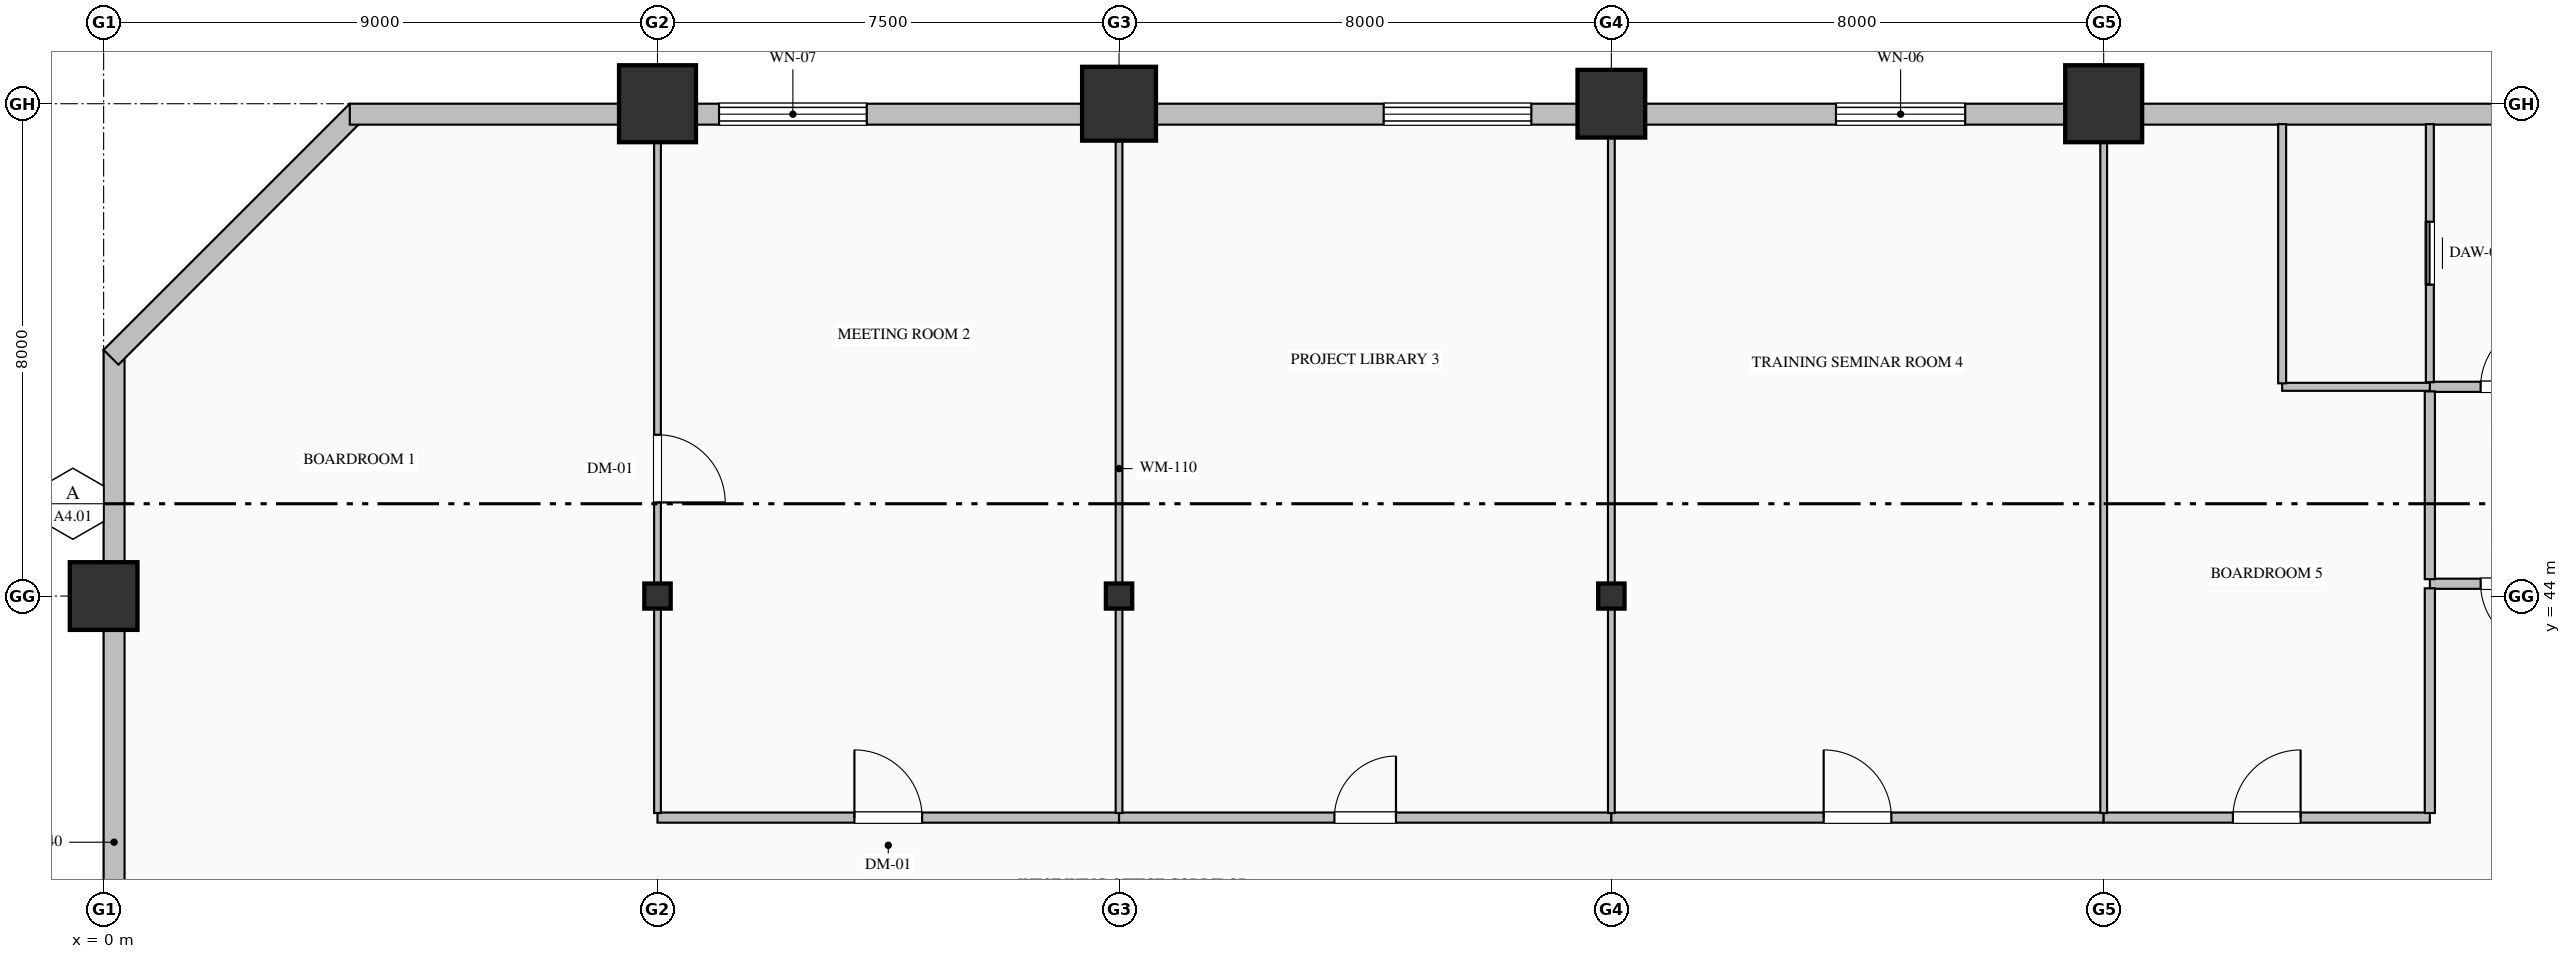
"""IFC4 building model, lengths in metres.
Left out: names, types, materials, properties, quantities, classifications, styles, units other than length and angle.
Written with IfcOpenShell. Run it as: python <this file> out.ifc"""

import sys

from ifc_helpers import new_model, si_unit, direction, frame, frame_2d, origin, origin_2d, place, context, subcontext, project, spatial, rectangle, hollow_rectangle, hollow_circle, i_section, extrude, element, fill, save


model = new_model("IFC4")
c1 = context("Model", 3, precision=1e-05, world=origin(), true_north=direction((0.0, 1.0)))
c2 = subcontext(c1, "Body", "Model", "MODEL_VIEW")
j1 = project(units=[si_unit("LENGTHUNIT", "METRE"), si_unit("PLANEANGLEUNIT", "RADIAN")], contexts=[c1])
p1 = place(None, origin())
s1 = spatial("IfcSite", under=j1, at=p1, CompositionType="ELEMENT")
p2 = place(p1, origin())
s2 = spatial("IfcBuilding", under=s1, at=p2, CompositionType="ELEMENT")
p3 = place(p2, frame((0.0, 0.0, 48.2)))
s3 = spatial("IfcBuildingStorey", under=s2, at=p3, CompositionType="ELEMENT", Elevation=48.2)
p4 = place(p3, frame((0.0, 44.0, 0.0), z_axis=(0.0, 0.0, 1.0), x_axis=(1.0, 0.0, 0.0)))
e1 = element("IfcColumn", 1, at=p4, inside=s3, PredefinedType="COLUMN", context=c2, shape_type="SweptSolid", body=[
    extrude(hollow_rectangle(XDim=1.1, YDim=1.1, WallThickness=0.04, at=origin_2d()), origin(), (0.0, 0.0, 1.0), 4.0),
])
p5 = place(p3, frame((9.0, 44.0, 0.0), z_axis=(0.0, 0.0, 1.0), x_axis=(1.0, 0.0, 0.0)))
e2 = element("IfcColumn", 2, at=p5, inside=s3, PredefinedType="COLUMN", context=c2, shape_type="SweptSolid", body=[
    extrude(i_section(OverallWidth=0.407, OverallDepth=0.428, WebThickness=0.02, FlangeThickness=0.035, FilletRadius=0.022, at=origin_2d()), origin(), (0.0, 0.0, 1.0), 4.0),
])
p6 = place(p3, frame((9.0, 52.0, 0.0), z_axis=(0.0, 0.0, 1.0), x_axis=(1.0, 0.0, 0.0)))
e3 = element("IfcColumn", 3, at=p6, inside=s3, PredefinedType="COLUMN", context=c2, shape_type="SweptSolid", body=[
    extrude(hollow_rectangle(XDim=1.25, YDim=1.25, WallThickness=0.045, at=origin_2d()), origin(), (0.0, 0.0, 1.0), 4.0),
])
p7 = place(p3, frame((16.5, 44.0, 0.0), z_axis=(0.0, 0.0, 1.0), x_axis=(1.0, 0.0, 0.0)))
e4 = element("IfcColumn", 4, at=p7, inside=s3, PredefinedType="COLUMN", context=c2, shape_type="SweptSolid", body=[
    extrude(i_section(OverallWidth=0.407, OverallDepth=0.428, WebThickness=0.02, FlangeThickness=0.035, FilletRadius=0.022, at=origin_2d()), origin(), (0.0, 0.0, 1.0), 4.0),
])
p8 = place(p3, frame((16.5, 52.0, 0.0), z_axis=(0.0, 0.0, 1.0), x_axis=(1.0, 0.0, 0.0)))
e5 = element("IfcColumn", 5, at=p8, inside=s3, PredefinedType="COLUMN", context=c2, shape_type="SweptSolid", body=[
    extrude(hollow_circle(Radius=0.6, WallThickness=0.04, at=origin_2d()), origin(), (0.0, 0.0, 1.0), 4.0),
])
p9 = place(p3, frame((24.5, 44.0, 0.0), z_axis=(0.0, 0.0, 1.0), x_axis=(1.0, 0.0, 0.0)))
e6 = element("IfcColumn", 6, at=p9, inside=s3, PredefinedType="COLUMN", context=c2, shape_type="SweptSolid", body=[
    extrude(i_section(OverallWidth=0.407, OverallDepth=0.428, WebThickness=0.02, FlangeThickness=0.035, FilletRadius=0.022, at=origin_2d()), origin(), (0.0, 0.0, 1.0), 4.0),
])
p10 = place(p3, frame((24.5, 52.0, 0.0), z_axis=(0.0, 0.0, 1.0), x_axis=(1.0, 0.0, 0.0)))
e7 = element("IfcColumn", 7, at=p10, inside=s3, PredefinedType="COLUMN", context=c2, shape_type="SweptSolid", body=[
    extrude(hollow_rectangle(XDim=1.1, YDim=1.1, WallThickness=0.04, at=origin_2d()), origin(), (0.0, 0.0, 1.0), 4.0),
])
p11 = place(p3, frame((32.5, 52.0, 0.0), z_axis=(0.0, 0.0, 1.0), x_axis=(1.0, 0.0, 0.0)))
e8 = element("IfcColumn", 8, at=p11, inside=s3, PredefinedType="COLUMN", context=c2, shape_type="SweptSolid", body=[
    extrude(hollow_rectangle(XDim=1.25, YDim=1.25, WallThickness=0.045, at=origin_2d()), origin(), (0.0, 0.0, 1.0), 4.0),
])
p12 = place(p3, frame((0.17, 32.0, 0.0), z_axis=(0.0, 0.0, 1.0), x_axis=(0.0, 1.0, 0.0)))
e9 = element("IfcWall", 9, at=p12, inside=s3, PredefinedType="SOLIDWALL", context=c2, shape_type="SweptSolid", body=[
    extrude(rectangle(XDim=16.0, YDim=0.34, at=frame_2d((8.0, 0.0))), origin(), (0.0, 0.0, 1.0), 3.25),
])
p13 = place(p3, frame((0.12, 47.88, 0.0), z_axis=(0.0, 0.0, 1.0), x_axis=(0.707106781187, 0.707106781187, 0.0)))
e10 = element("IfcWall", 10, at=p13, inside=s3, PredefinedType="SOLIDWALL", context=c2, shape_type="SweptSolid", body=[
    extrude(rectangle(XDim=5.657, YDim=0.34, at=frame_2d((2.828, 0.0))), origin(), (0.0, 0.0, 1.0), 3.75),
])
p14 = place(p3, frame((4.0, 51.83, 0.0), z_axis=(0.0, 0.0, 1.0), x_axis=(1.0, 0.0, 0.0)))
e11 = element("IfcWall", 11, at=p14, inside=s3, PredefinedType="SOLIDWALL", context=c2, shape_type="SweptSolid", body=[
    extrude(rectangle(XDim=36.52, YDim=0.34, at=frame_2d((18.26, 0.0))), origin(), (0.0, 0.0, 1.0), 3.25),
])
p15 = place(p14, frame((6.0, 0.0, 0.8)))
e12 = element("IfcOpeningElement", 12, at=p15, cuts=e11, PredefinedType="OPENING", context=c2, shape_type="SweptSolid", body=[
    extrude(rectangle(XDim=2.4, YDim=2.15, at=frame_2d((1.2, 1.075))), frame((0.0, 0.18, 0.0), z_axis=(0.0, -1.0, 0.0), x_axis=(1.0, 0.0, 0.0)), (0.0, 0.0, 1.0), 0.36),
])
p16 = place(p14, frame((16.8, 0.0, 0.8)))
e13 = element("IfcOpeningElement", 13, at=p16, cuts=e11, PredefinedType="OPENING", context=c2, shape_type="SweptSolid", body=[
    extrude(rectangle(XDim=2.4, YDim=2.15, at=frame_2d((1.2, 1.075))), frame((0.0, 0.18, 0.0), z_axis=(0.0, -1.0, 0.0), x_axis=(1.0, 0.0, 0.0)), (0.0, 0.0, 1.0), 0.36),
])
p17 = place(p14, frame((24.15, 0.0, 0.85)))
e14 = element("IfcOpeningElement", 14, at=p17, cuts=e11, PredefinedType="OPENING", context=c2, shape_type="SweptSolid", body=[
    extrude(rectangle(XDim=2.1, YDim=2.05, at=frame_2d((1.05, 1.025))), frame((0.0, 0.18, 0.0), z_axis=(0.0, -1.0, 0.0), x_axis=(1.0, 0.0, 0.0)), (0.0, 0.0, 1.0), 0.36),
])
p18 = place(p3, frame((37.8, 47.4, 0.0), z_axis=(0.0, 0.0, 1.0), x_axis=(1.0, 0.0, 0.0)))
e15 = element("IfcWall", 15, at=p18, inside=s3, PredefinedType="PARTITIONING", context=c2, shape_type="SweptSolid", body=[
    extrude(rectangle(XDim=2.7, YDim=0.165, at=frame_2d((1.35, 0.0))), origin(), (0.0, 0.0, 1.0), 3.75),
])
p19 = place(p18, frame((0.825, 0.0, 0.0)))
e16 = element("IfcOpeningElement", 16, at=p19, cuts=e15, PredefinedType="OPENING", context=c2, shape_type="SweptSolid", body=[
    extrude(rectangle(XDim=1.05, YDim=2.15, at=frame_2d((0.525, 1.075))), frame((0.0, 0.093, 0.0), z_axis=(0.0, -1.0, 0.0), x_axis=(1.0, 0.0, 0.0)), (0.0, 0.0, 1.0), 0.185),
])
p20 = place(p3, frame((40.5, 44.2, 0.0), z_axis=(0.0, 0.0, 1.0), x_axis=(-1.0, 0.0, 0.0)))
e17 = element("IfcWall", 17, at=p20, inside=s3, PredefinedType="PARTITIONING", context=c2, shape_type="SweptSolid", body=[
    extrude(rectangle(XDim=2.7, YDim=0.165, at=frame_2d((1.35, 0.0))), origin(), (0.0, 0.0, 1.0), 3.75),
])
p21 = place(p20, frame((0.825, 0.0, 0.0)))
e18 = element("IfcOpeningElement", 18, at=p21, cuts=e17, PredefinedType="OPENING", context=c2, shape_type="SweptSolid", body=[
    extrude(rectangle(XDim=1.05, YDim=2.15, at=frame_2d((0.525, 1.075))), frame((0.0, 0.093, 0.0), z_axis=(0.0, -1.0, 0.0), x_axis=(1.0, 0.0, 0.0)), (0.0, 0.0, 1.0), 0.185),
])
p22 = place(p3, frame((37.8, 44.274, 0.0), z_axis=(0.0, 0.0, 1.0), x_axis=(0.0, 1.0, 0.0)))
e19 = element("IfcWall", 19, at=p22, inside=s3, PredefinedType="PARTITIONING", context=c2, shape_type="SweptSolid", body=[
    extrude(rectangle(XDim=3.051, YDim=0.165, at=frame_2d((1.525, 0.0))), origin(), (0.0, 0.0, 1.0), 3.75),
])
p23 = place(p3, frame((37.8, 47.475, 0.0), z_axis=(0.0, 0.0, 1.0), x_axis=(0.0, 1.0, 0.0)))
e20 = element("IfcWall", 20, at=p23, inside=s3, PredefinedType="PARTITIONING", context=c2, shape_type="SweptSolid", body=[
    extrude(rectangle(XDim=4.193, YDim=0.13, at=frame_2d((2.097, 0.0))), origin(), (0.0, 0.0, 1.0), 3.75),
])
p24 = place(p23, frame((1.587, 0.0, 0.0)))
e21 = element("IfcOpeningElement", 21, at=p24, cuts=e20, PredefinedType="OPENING", context=c2, shape_type="SweptSolid", body=[
    extrude(rectangle(XDim=1.02, YDim=2.15, at=frame_2d((0.51, 1.075))), frame((0.0, 0.075, 0.0), z_axis=(0.0, -1.0, 0.0), x_axis=(1.0, 0.0, 0.0)), (0.0, 0.0, 1.0), 0.15),
])
p25 = place(p3, frame((37.8, 47.4, 0.0), z_axis=(0.0, 0.0, 1.0), x_axis=(-1.0, 0.0, 0.0)))
e22 = element("IfcWall", 22, at=p25, inside=s3, PredefinedType="PARTITIONING", context=c2, shape_type="SweptSolid", body=[
    extrude(rectangle(XDim=2.4, YDim=0.13, at=frame_2d((1.2, 0.0))), origin(), (0.0, 0.0, 1.0), 3.75),
])
p26 = place(p3, frame((35.4, 47.457, 0.0), z_axis=(0.0, 0.0, 1.0), x_axis=(0.0, 1.0, 0.0)))
e23 = element("IfcWall", 23, at=p26, inside=s3, PredefinedType="PARTITIONING", context=c2, shape_type="SweptSolid", body=[
    extrude(rectangle(XDim=4.211, YDim=0.13, at=frame_2d((2.105, 0.0))), origin(), (0.0, 0.0, 1.0), 3.75),
])
p27 = place(p3, frame((9.0, 40.4, 0.0), z_axis=(0.0, 0.0, 1.0), x_axis=(1.0, 0.0, 0.0)))
e24 = element("IfcWall", 24, at=p27, inside=s3, PredefinedType="PARTITIONING", context=c2, shape_type="SweptSolid", body=[
    extrude(rectangle(XDim=7.5, YDim=0.165, at=frame_2d((3.75, 0.0))), origin(), (0.0, 0.0, 1.0), 3.75),
])
p28 = place(p27, frame((3.2, 0.0, 0.0)))
e25 = element("IfcOpeningElement", 25, at=p28, cuts=e24, PredefinedType="OPENING", context=c2, shape_type="SweptSolid", body=[
    extrude(rectangle(XDim=1.1, YDim=2.2, at=frame_2d((0.55, 1.1))), frame((0.0, 0.093, 0.0), z_axis=(0.0, -1.0, 0.0), x_axis=(1.0, 0.0, 0.0)), (0.0, 0.0, 1.0), 0.185),
])
p29 = place(p3, frame((16.5, 40.4, 0.0), z_axis=(0.0, 0.0, 1.0), x_axis=(1.0, 0.0, 0.0)))
e26 = element("IfcWall", 26, at=p29, inside=s3, PredefinedType="PARTITIONING", context=c2, shape_type="SweptSolid", body=[
    extrude(rectangle(XDim=8.0, YDim=0.165, at=frame_2d((4.0, 0.0))), origin(), (0.0, 0.0, 1.0), 3.75),
])
p30 = place(p29, frame((3.5, 0.0, 0.0)))
e27 = element("IfcOpeningElement", 27, at=p30, cuts=e26, PredefinedType="OPENING", context=c2, shape_type="SweptSolid", body=[
    extrude(rectangle(XDim=1.0, YDim=2.15, at=frame_2d((0.5, 1.075))), frame((0.0, 0.093, 0.0), z_axis=(0.0, -1.0, 0.0), x_axis=(1.0, 0.0, 0.0)), (0.0, 0.0, 1.0), 0.185),
])
p31 = place(p3, frame((24.5, 40.4, 0.0), z_axis=(0.0, 0.0, 1.0), x_axis=(1.0, 0.0, 0.0)))
e28 = element("IfcWall", 28, at=p31, inside=s3, PredefinedType="PARTITIONING", context=c2, shape_type="SweptSolid", body=[
    extrude(rectangle(XDim=8.0, YDim=0.165, at=frame_2d((4.0, 0.0))), origin(), (0.0, 0.0, 1.0), 3.75),
])
p32 = place(p31, frame((3.45, 0.0, 0.0)))
e29 = element("IfcOpeningElement", 29, at=p32, cuts=e28, PredefinedType="OPENING", context=c2, shape_type="SweptSolid", body=[
    extrude(rectangle(XDim=1.1, YDim=2.2, at=frame_2d((0.55, 1.1))), frame((0.0, 0.093, 0.0), z_axis=(0.0, -1.0, 0.0), x_axis=(1.0, 0.0, 0.0)), (0.0, 0.0, 1.0), 0.185),
])
p33 = place(p3, frame((32.5, 40.4, 0.0), z_axis=(0.0, 0.0, 1.0), x_axis=(1.0, 0.0, 0.0)))
e30 = element("IfcWall", 30, at=p33, inside=s3, PredefinedType="PARTITIONING", context=c2, shape_type="SweptSolid", body=[
    extrude(rectangle(XDim=5.3, YDim=0.165, at=frame_2d((2.65, 0.0))), origin(), (0.0, 0.0, 1.0), 3.75),
])
p34 = place(p33, frame((2.1, 0.0, 0.0)))
e31 = element("IfcOpeningElement", 31, at=p34, cuts=e30, PredefinedType="OPENING", context=c2, shape_type="SweptSolid", body=[
    extrude(rectangle(XDim=1.1, YDim=2.2, at=frame_2d((0.55, 1.1))), frame((0.0, 0.093, 0.0), z_axis=(0.0, -1.0, 0.0), x_axis=(1.0, 0.0, 0.0)), (0.0, 0.0, 1.0), 0.185),
])
p35 = place(p3, frame((37.8, 40.475, 0.0), z_axis=(0.0, 0.0, 1.0), x_axis=(0.0, 1.0, 0.0)))
e32 = element("IfcWall", 32, at=p35, inside=s3, PredefinedType="PARTITIONING", context=c2, shape_type="SweptSolid", body=[
    extrude(rectangle(XDim=3.651, YDim=0.165, at=frame_2d((1.825, 0.0))), origin(), (0.0, 0.0, 1.0), 3.75),
])
p36 = place(p3, frame((9.0, 51.668, 0.0), z_axis=(0.0, 0.0, 1.0), x_axis=(0.0, -1.0, 0.0)))
e33 = element("IfcWall", 33, at=p36, inside=s3, PredefinedType="MOVABLE", context=c2, shape_type="SweptSolid", body=[
    extrude(rectangle(XDim=11.193, YDim=0.11, at=frame_2d((5.597, 0.0))), origin(), (0.0, 0.0, 1.0), 3.042),
])
p37 = place(p36, frame((5.047, 0.0, 0.0)))
e34 = element("IfcOpeningElement", 34, at=p37, cuts=e33, PredefinedType="OPENING", context=c2, shape_type="SweptSolid", body=[
    extrude(rectangle(XDim=1.1, YDim=2.2, at=frame_2d((0.55, 1.1))), frame((0.0, 0.065, 0.0), z_axis=(0.0, -1.0, 0.0), x_axis=(1.0, 0.0, 0.0)), (0.0, 0.0, 1.0), 0.13),
])
for number, where, z_axis, x_axis in (
    (35, (16.5, 51.668, 0.0), (0.0, 0.0, 1.0), (0.0, -1.0, 0.0)),
    (36, (24.5, 51.668, 0.0), (0.0, 0.0, 1.0), (0.0, -1.0, 0.0)),
):
    element("IfcWall", number, at=place(p3, frame(where, z_axis=z_axis, x_axis=x_axis)), inside=s3, PredefinedType="MOVABLE", context=c2, shape_type="SweptSolid", body=[
        extrude(rectangle(XDim=11.193, YDim=0.11, at=frame_2d((5.597, 0.0))), origin(), (0.0, 0.0, 1.0), 3.042),
    ])
p38 = place(p3, frame((32.5, 51.668, 0.0), z_axis=(0.0, 0.0, 1.0), x_axis=(0.0, -1.0, 0.0)))
e37 = element("IfcWall", 37, at=p38, inside=s3, PredefinedType="MOVABLE", context=c2, shape_type="SweptSolid", body=[
    extrude(rectangle(XDim=11.193, YDim=0.11, at=frame_2d((5.597, 0.0))), origin(), (0.0, 0.0, 1.0), 3.75),
])
p39 = place(p15, origin())
e38 = element("IfcWindow", 38, at=p39, inside=s3, PartitioningType="TRIPLE_PANEL_VERTICAL", PredefinedType="WINDOW", context=c2, shape_type="SweptSolid", body=[
    extrude(rectangle(XDim=2.4, YDim=2.15, at=frame_2d((1.2, 1.075))), frame((0.0, 0.15, 0.0), z_axis=(0.0, -1.0, 0.0), x_axis=(1.0, 0.0, 0.0)), (0.0, 0.0, 1.0), 0.06),
])
fill(e12, e38)
p40 = place(p16, origin())
e39 = element("IfcWindow", 39, at=p40, inside=s3, PartitioningType="TRIPLE_PANEL_VERTICAL", PredefinedType="WINDOW", context=c2, shape_type="SweptSolid", body=[
    extrude(rectangle(XDim=2.4, YDim=2.15, at=frame_2d((1.2, 1.075))), frame((0.0, 0.15, 0.0), z_axis=(0.0, -1.0, 0.0), x_axis=(1.0, 0.0, 0.0)), (0.0, 0.0, 1.0), 0.06),
])
fill(e13, e39)
p41 = place(p17, origin())
e40 = element("IfcWindow", 40, at=p41, inside=s3, PartitioningType="TRIPLE_PANEL_VERTICAL", PredefinedType="WINDOW", context=c2, shape_type="SweptSolid", body=[
    extrude(rectangle(XDim=2.1, YDim=2.05, at=frame_2d((1.05, 1.025))), frame((0.0, 0.15, 0.0), z_axis=(0.0, -1.0, 0.0), x_axis=(1.0, 0.0, 0.0)), (0.0, 0.0, 1.0), 0.06),
])
fill(e14, e40)
p42 = place(p19, origin())
e41 = element("IfcDoor", 41, at=p42, inside=s3, OperationType="SINGLE_SWING_RIGHT", PredefinedType="DOOR", context=c2, shape_type="SweptSolid", body=[
    extrude(rectangle(XDim=1.05, YDim=2.15, at=frame_2d((0.525, 1.075))), frame((0.0, 0.025, 0.0), z_axis=(0.0, -1.0, 0.0), x_axis=(1.0, 0.0, 0.0)), (0.0, 0.0, 1.0), 0.05),
])
fill(e16, e41)
p43 = place(p21, origin())
e42 = element("IfcDoor", 42, at=p43, inside=s3, OperationType="SINGLE_SWING_LEFT", PredefinedType="DOOR", context=c2, shape_type="SweptSolid", body=[
    extrude(rectangle(XDim=1.05, YDim=2.15, at=frame_2d((0.525, 1.075))), frame((0.0, 0.025, 0.0), z_axis=(0.0, -1.0, 0.0), x_axis=(1.0, 0.0, 0.0)), (0.0, 0.0, 1.0), 0.05),
])
fill(e18, e42)
p44 = place(p24, origin())
e43 = element("IfcDoor", 43, at=p44, inside=s3, OperationType="SLIDING_TO_LEFT", PredefinedType="DOOR", context=c2, shape_type="SweptSolid", body=[
    extrude(rectangle(XDim=1.02, YDim=2.15, at=frame_2d((0.51, 1.075))), frame((0.0, 0.025, 0.0), z_axis=(0.0, -1.0, 0.0), x_axis=(1.0, 0.0, 0.0)), (0.0, 0.0, 1.0), 0.05),
])
fill(e21, e43)
p45 = place(p37, origin())
e44 = element("IfcDoor", 44, at=p45, inside=s3, OperationType="SINGLE_SWING_RIGHT", PredefinedType="DOOR", context=c2, shape_type="SweptSolid", body=[
    extrude(rectangle(XDim=1.1, YDim=2.2, at=frame_2d((0.55, 1.1))), frame((0.0, 0.025, 0.0), z_axis=(0.0, -1.0, 0.0), x_axis=(1.0, 0.0, 0.0)), (0.0, 0.0, 1.0), 0.05),
])
fill(e34, e44)
p46 = place(p28, origin())
e45 = element("IfcDoor", 45, at=p46, inside=s3, OperationType="SINGLE_SWING_LEFT", PredefinedType="DOOR", context=c2, shape_type="SweptSolid", body=[
    extrude(rectangle(XDim=1.1, YDim=2.2, at=frame_2d((0.55, 1.1))), frame((0.0, 0.025, 0.0), z_axis=(0.0, -1.0, 0.0), x_axis=(1.0, 0.0, 0.0)), (0.0, 0.0, 1.0), 0.05),
])
fill(e25, e45)
p47 = place(p30, origin())
e46 = element("IfcDoor", 46, at=p47, inside=s3, OperationType="SINGLE_SWING_RIGHT", PredefinedType="DOOR", context=c2, shape_type="SweptSolid", body=[
    extrude(rectangle(XDim=1.0, YDim=2.15, at=frame_2d((0.5, 1.075))), frame((0.0, 0.025, 0.0), z_axis=(0.0, -1.0, 0.0), x_axis=(1.0, 0.0, 0.0)), (0.0, 0.0, 1.0), 0.05),
])
fill(e27, e46)
p48 = place(p32, origin())
e47 = element("IfcDoor", 47, at=p48, inside=s3, OperationType="SINGLE_SWING_LEFT", PredefinedType="DOOR", context=c2, shape_type="SweptSolid", body=[
    extrude(rectangle(XDim=1.1, YDim=2.2, at=frame_2d((0.55, 1.1))), frame((0.0, 0.025, 0.0), z_axis=(0.0, -1.0, 0.0), x_axis=(1.0, 0.0, 0.0)), (0.0, 0.0, 1.0), 0.05),
])
fill(e29, e47)
p49 = place(p34, origin())
e48 = element("IfcDoor", 48, at=p49, inside=s3, OperationType="SINGLE_SWING_RIGHT", PredefinedType="DOOR", context=c2, shape_type="SweptSolid", body=[
    extrude(rectangle(XDim=1.1, YDim=2.2, at=frame_2d((0.55, 1.1))), frame((0.0, 0.025, 0.0), z_axis=(0.0, -1.0, 0.0), x_axis=(1.0, 0.0, 0.0)), (0.0, 0.0, 1.0), 0.05),
])
fill(e31, e48)
save(model, sys.argv[1])
